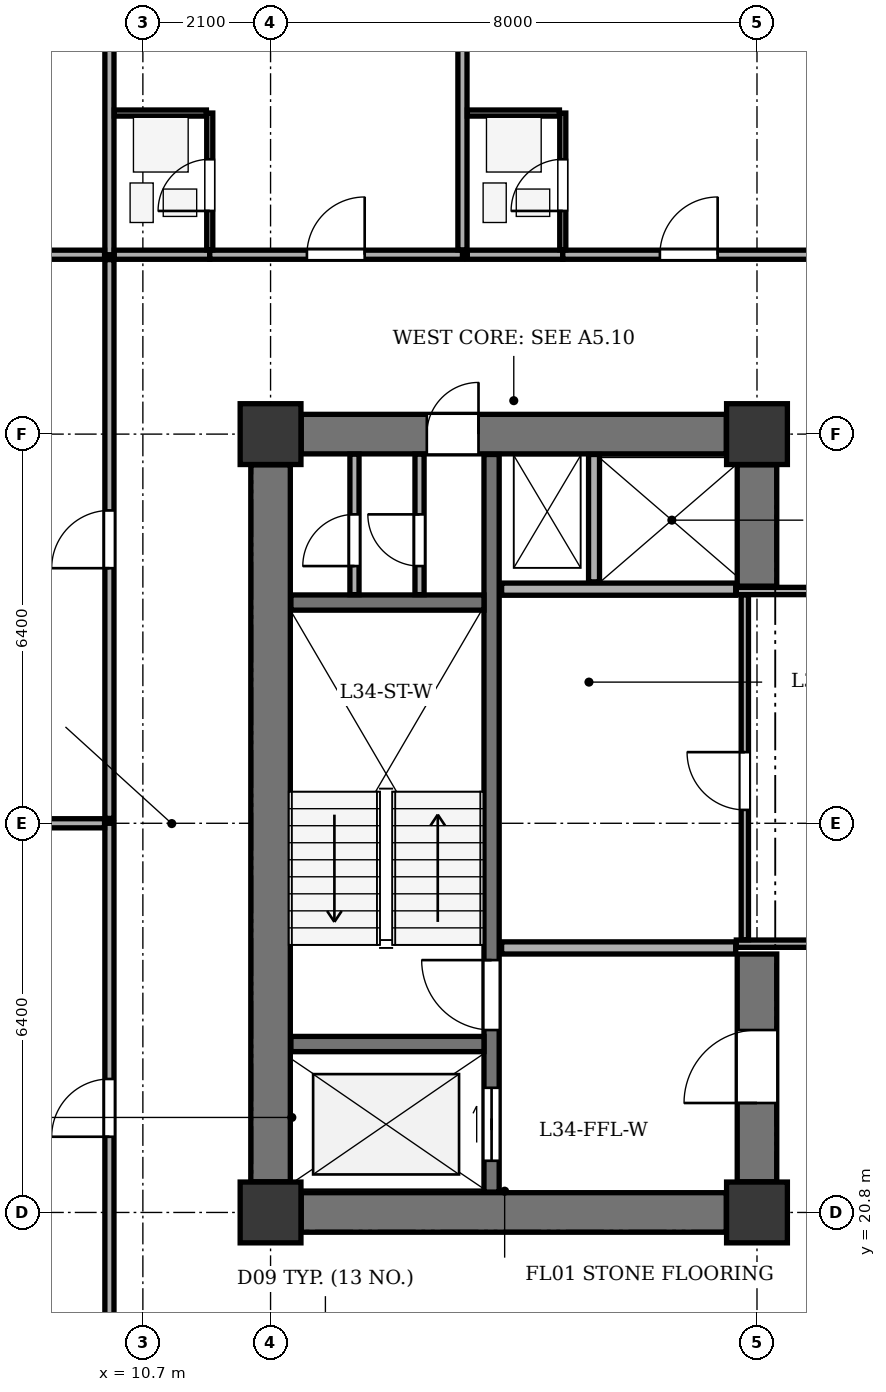
"""IFC4 building model, lengths in metres.
Left out: names, types, materials, properties, quantities, classifications, styles, units other than length and angle.
Written with IfcOpenShell. Run it as: python <this file> out.ifc"""

import sys

from ifc_helpers import new_model, si_unit, direction, frame, frame_2d, origin, origin_2d, place, context, subcontext, project, spatial, rectangle, extrude, element, fill, save


model = new_model("IFC4")
c1 = context("Model", 3, precision=1e-05, world=origin(), true_north=direction((0.0, 1.0)))
c2 = subcontext(c1, "Body", "Model", "MODEL_VIEW")
j1 = project(units=[si_unit("LENGTHUNIT", "METRE"), si_unit("PLANEANGLEUNIT", "RADIAN")], contexts=[c1])
p1 = place(None, origin())
s1 = spatial("IfcSite", under=j1, at=p1, CompositionType="ELEMENT")
p2 = place(p1, origin())
s2 = spatial("IfcBuilding", under=s1, at=p2, CompositionType="ELEMENT")
p3 = place(p2, frame((0.0, 0.0, 137.8)))
s3 = spatial("IfcBuildingStorey", under=s2, at=p3, CompositionType="ELEMENT", Elevation=137.8)
for number, where, z_axis, x_axis in (
    (1, (12.8, 20.8, 0.0), (0.0, 0.0, 1.0), (1.0, 0.0, 0.0)),
    (2, (20.8, 20.8, 0.0), (0.0, 0.0, 1.0), (1.0, 0.0, 0.0)),
    (3, (12.8, 33.6, 0.0), (0.0, 0.0, 1.0), (1.0, 0.0, 0.0)),
    (4, (20.8, 33.6, 0.0), (0.0, 0.0, 1.0), (1.0, 0.0, 0.0)),
):
    element("IfcColumn", number, at=place(p3, frame(where, z_axis=z_axis, x_axis=x_axis)), inside=s3, PredefinedType="COLUMN", context=c2, shape_type="SweptSolid", body=[
        extrude(rectangle(XDim=1.0, YDim=1.0, at=origin_2d()), origin(), (0.0, 0.0, 1.0), 3.5),
    ])
p4 = place(p3, frame((12.8, 21.305, 0.0), z_axis=(0.0, 0.0, 1.0), x_axis=(0.0, 1.0, 0.0)))
e5 = element("IfcWall", 5, at=p4, inside=s3, PredefinedType="SHEAR", context=c2, shape_type="SweptSolid", body=[
    extrude(rectangle(XDim=11.79, YDim=0.65, at=frame_2d((5.895, 0.0))), origin(), (0.0, 0.0, 1.0), 3.05),
])
p5 = place(p3, frame((13.305, 20.8, 0.0), z_axis=(0.0, 0.0, 1.0), x_axis=(1.0, 0.0, 0.0)))
e6 = element("IfcWall", 6, at=p5, inside=s3, PredefinedType="SHEAR", context=c2, shape_type="SweptSolid", body=[
    extrude(rectangle(XDim=6.99, YDim=0.65, at=frame_2d((3.495, 0.0))), origin(), (0.0, 0.0, 1.0), 3.05),
])
p6 = place(p3, frame((13.305, 33.6, 0.0), z_axis=(0.0, 0.0, 1.0), x_axis=(1.0, 0.0, 0.0)))
e7 = element("IfcWall", 7, at=p6, inside=s3, PredefinedType="SHEAR", context=c2, shape_type="SweptSolid", body=[
    extrude(rectangle(XDim=6.99, YDim=0.65, at=frame_2d((3.495, 0.0))), origin(), (0.0, 0.0, 1.0), 3.05),
])
p7 = place(p6, frame((2.065, 0.0, 0.0)))
e8 = element("IfcOpeningElement", 8, at=p7, cuts=e7, PredefinedType="OPENING", context=c2, shape_type="SweptSolid", body=[
    extrude(rectangle(XDim=0.85, YDim=2.02, at=frame_2d((0.425, 1.01))), frame((0.0, 0.335, 0.0), z_axis=(0.0, -1.0, 0.0), x_axis=(1.0, 0.0, 0.0)), (0.0, 0.0, 1.0), 0.67),
])
p8 = place(p3, frame((20.8, 21.305, 0.0), z_axis=(0.0, 0.0, 1.0), x_axis=(0.0, 1.0, 0.0)))
e9 = element("IfcWall", 9, at=p8, inside=s3, PredefinedType="SHEAR", context=c2, shape_type="SweptSolid", body=[
    extrude(rectangle(XDim=3.745, YDim=0.65, at=frame_2d((1.873, 0.0))), origin(), (0.0, 0.0, 1.0), 3.05),
])
p9 = place(p8, frame((1.295, 0.0, 0.0)))
e10 = element("IfcOpeningElement", 10, at=p9, cuts=e9, PredefinedType="OPENING", context=c2, shape_type="SweptSolid", body=[
    extrude(rectangle(XDim=1.2, YDim=2.15, at=frame_2d((0.6, 1.075))), frame((0.0, 0.335, 0.0), z_axis=(0.0, -1.0, 0.0), x_axis=(1.0, 0.0, 0.0)), (0.0, 0.0, 1.0), 0.67),
])
p10 = place(p3, frame((20.8, 31.1, 0.0), z_axis=(0.0, 0.0, 1.0), x_axis=(0.0, 1.0, 0.0)))
e11 = element("IfcWall", 11, at=p10, inside=s3, PredefinedType="SHEAR", context=c2, shape_type="SweptSolid", body=[
    extrude(rectangle(XDim=1.995, YDim=0.65, at=frame_2d((0.998, 0.0))), origin(), (0.0, 0.0, 1.0), 3.05),
])
p11 = place(p3, frame((16.435, 21.135, 0.0), z_axis=(0.0, 0.0, 1.0), x_axis=(0.0, 1.0, 0.0)))
e12 = element("IfcWall", 12, at=p11, inside=s3, PredefinedType="SHEAR", context=c2, shape_type="SweptSolid", body=[
    extrude(rectangle(XDim=12.13, YDim=0.25, at=frame_2d((6.065, 0.0))), origin(), (0.0, 0.0, 1.0), 3.05),
])
p12 = place(p11, frame((0.515, 0.0, 0.0)))
e13 = element("IfcOpeningElement", 13, at=p12, cuts=e12, PredefinedType="OPENING", context=c2, shape_type="SweptSolid", body=[
    extrude(rectangle(XDim=1.2, YDim=2.15, at=frame_2d((0.6, 1.075))), frame((0.0, 0.135, 0.0), z_axis=(0.0, -1.0, 0.0), x_axis=(1.0, 0.0, 0.0)), (0.0, 0.0, 1.0), 0.27),
])
p13 = place(p11, frame((2.665, 0.0, 0.0)))
e14 = element("IfcOpeningElement", 14, at=p13, cuts=e12, PredefinedType="OPENING", context=c2, shape_type="SweptSolid", body=[
    extrude(rectangle(XDim=1.15, YDim=2.15, at=frame_2d((0.575, 1.075))), frame((0.0, 0.135, 0.0), z_axis=(0.0, -1.0, 0.0), x_axis=(1.0, 0.0, 0.0)), (0.0, 0.0, 1.0), 0.27),
])
for number, where, z_axis, x_axis in (
    (15, (13.135, 23.57, 0.0), (0.0, 0.0, 1.0), (1.0, 0.0, 0.0)),
    (16, (13.135, 30.83, 0.0), (0.0, 0.0, 1.0), (1.0, 0.0, 0.0)),
):
    element("IfcWall", number, at=place(p3, frame(where, z_axis=z_axis, x_axis=x_axis)), inside=s3, PredefinedType="SHEAR", context=c2, shape_type="SweptSolid", body=[
        extrude(rectangle(XDim=3.175, YDim=0.25, at=frame_2d((1.587, 0.0))), origin(), (0.0, 0.0, 1.0), 3.05),
    ])
for number, where, z_axis, x_axis in (
    (17, (16.6, 25.15, 0.0), (0.0, 0.0, 1.0), (1.0, 0.0, 0.0)),
    (18, (16.6, 31.05, 0.0), (0.0, 0.0, 1.0), (1.0, 0.0, 0.0)),
):
    element("IfcWall", number, at=place(p3, frame(where, z_axis=z_axis, x_axis=x_axis)), inside=s3, PredefinedType="SOLIDWALL", context=c2, shape_type="SweptSolid", body=[
        extrude(rectangle(XDim=3.85, YDim=0.2, at=frame_2d((1.925, 0.0))), origin(), (0.0, 0.0, 1.0), 3.05),
    ])
p14 = place(p3, frame((18.12, 31.17, 0.0), z_axis=(0.0, 0.0, 1.0), x_axis=(0.0, 1.0, 0.0)))
e19 = element("IfcWall", 19, at=p14, inside=s3, PredefinedType="PARTITIONING", context=c2, shape_type="SweptSolid", body=[
    extrude(rectangle(XDim=2.095, YDim=0.18, at=frame_2d((1.047, 0.0))), origin(), (0.0, 0.0, 1.0), 3.05),
])
p15 = place(p3, frame((14.18, 30.96, 0.0), z_axis=(0.0, 0.0, 1.0), x_axis=(0.0, 1.0, 0.0)))
e20 = element("IfcWall", 20, at=p15, inside=s3, PredefinedType="PARTITIONING", context=c2, shape_type="SweptSolid", body=[
    extrude(rectangle(XDim=2.31, YDim=0.15, at=frame_2d((1.155, 0.0))), origin(), (0.0, 0.0, 1.0), 3.05),
])
p16 = place(p15, frame((0.47, 0.0, 0.0)))
e21 = element("IfcOpeningElement", 21, at=p16, cuts=e20, PredefinedType="OPENING", context=c2, shape_type="SweptSolid", body=[
    extrude(rectangle(XDim=0.85, YDim=2.02, at=frame_2d((0.425, 1.01))), frame((0.0, 0.085, 0.0), z_axis=(0.0, -1.0, 0.0), x_axis=(1.0, 0.0, 0.0)), (0.0, 0.0, 1.0), 0.17),
])
p17 = place(p3, frame((15.25, 30.96, 0.0), z_axis=(0.0, 0.0, 1.0), x_axis=(0.0, 1.0, 0.0)))
e22 = element("IfcWall", 22, at=p17, inside=s3, PredefinedType="PARTITIONING", context=c2, shape_type="SweptSolid", body=[
    extrude(rectangle(XDim=2.31, YDim=0.15, at=frame_2d((1.155, 0.0))), origin(), (0.0, 0.0, 1.0), 3.05),
])
p18 = place(p17, frame((0.47, 0.0, 0.0)))
e23 = element("IfcOpeningElement", 23, at=p18, cuts=e22, PredefinedType="OPENING", context=c2, shape_type="SweptSolid", body=[
    extrude(rectangle(XDim=0.85, YDim=2.02, at=frame_2d((0.425, 1.01))), frame((0.0, 0.085, 0.0), z_axis=(0.0, -1.0, 0.0), x_axis=(1.0, 0.0, 0.0)), (0.0, 0.0, 1.0), 0.17),
])
p19 = place(p3, frame((20.46, 25.22, 0.0), z_axis=(0.0, 0.0, 1.0), x_axis=(1.0, 0.0, 0.0)))
e24 = element("IfcWall", 24, at=p19, inside=s3, PredefinedType="PARTITIONING", context=c2, shape_type="SweptSolid", body=[
    extrude(rectangle(XDim=11.94, YDim=0.12, at=frame_2d((5.97, 0.0))), origin(), (0.0, 0.0, 1.0), 3.05),
])
p20 = place(p19, frame((2.39, 0.0, 0.0)))
e25 = element("IfcOpeningElement", 25, at=p20, cuts=e24, PredefinedType="OPENING", context=c2, shape_type="SweptSolid", body=[
    extrude(rectangle(XDim=1.0, YDim=2.1, at=frame_2d((0.5, 1.05))), frame((0.0, 0.07, 0.0), z_axis=(0.0, -1.0, 0.0), x_axis=(1.0, 0.0, 0.0)), (0.0, 0.0, 1.0), 0.14),
])
p21 = place(p3, frame((20.46, 31.02, 0.0), z_axis=(0.0, 0.0, 1.0), x_axis=(1.0, 0.0, 0.0)))
e26 = element("IfcWall", 26, at=p21, inside=s3, PredefinedType="PARTITIONING", context=c2, shape_type="SweptSolid", body=[
    extrude(rectangle(XDim=11.94, YDim=0.12, at=frame_2d((5.97, 0.0))), origin(), (0.0, 0.0, 1.0), 3.05),
])
p22 = place(p3, frame((20.6, 25.285, 0.0), z_axis=(0.0, 0.0, 1.0), x_axis=(0.0, 1.0, 0.0)))
e27 = element("IfcWall", 27, at=p22, inside=s3, PredefinedType="PARTITIONING", context=c2, shape_type="SweptSolid", body=[
    extrude(rectangle(XDim=5.67, YDim=0.12, at=frame_2d((2.835, 0.0))), origin(), (0.0, 0.0, 1.0), 2.585),
])
p23 = place(p22, frame((2.135, 0.0, 0.0)))
e28 = element("IfcOpeningElement", 28, at=p23, cuts=e27, PredefinedType="OPENING", context=c2, shape_type="SweptSolid", body=[
    extrude(rectangle(XDim=0.95, YDim=2.1, at=frame_2d((0.475, 1.05))), frame((0.0, 0.07, 0.0), z_axis=(0.0, -1.0, 0.0), x_axis=(1.0, 0.0, 0.0)), (0.0, 0.0, 1.0), 0.14),
])
p24 = place(p3, frame((10.15, 36.55, 0.0), z_axis=(0.0, 0.0, 1.0), x_axis=(0.0, 1.0, 0.0)))
e29 = element("IfcWall", 29, at=p24, inside=s3, PredefinedType="PARTITIONING", context=c2, shape_type="SweptSolid", body=[
    extrude(rectangle(XDim=9.575, YDim=0.15, at=frame_2d((4.788, 0.0))), origin(), (0.0, 0.0, 1.0), 3.05),
])
p25 = place(p3, frame((10.23, 36.55, 0.0), z_axis=(0.0, 0.0, 1.0), x_axis=(1.0, 0.0, 0.0)))
e30 = element("IfcWall", 30, at=p25, inside=s3, PredefinedType="PARTITIONING", context=c2, shape_type="SweptSolid", body=[
    extrude(rectangle(XDim=1.57, YDim=0.15, at=frame_2d((0.785, 0.0))), origin(), (0.0, 0.0, 1.0), 3.05),
])
p26 = place(p3, frame((11.8, 36.55, 0.0), z_axis=(0.0, 0.0, 1.0), x_axis=(1.0, 0.0, 0.0)))
e31 = element("IfcWall", 31, at=p26, inside=s3, PredefinedType="PARTITIONING", context=c2, shape_type="SweptSolid", body=[
    extrude(rectangle(XDim=4.156, YDim=0.15, at=frame_2d((2.078, 0.0))), origin(), (0.0, 0.0, 1.0), 3.05),
])
p27 = place(p26, frame((1.598, 0.0, 0.0)))
e32 = element("IfcOpeningElement", 32, at=p27, cuts=e31, PredefinedType="OPENING", context=c2, shape_type="SweptSolid", body=[
    extrude(rectangle(XDim=0.95, YDim=2.1, at=frame_2d((0.475, 1.05))), frame((0.0, 0.085, 0.0), z_axis=(0.0, -1.0, 0.0), x_axis=(1.0, 0.0, 0.0)), (0.0, 0.0, 1.0), 0.17),
])
p28 = place(p3, frame((11.8, 36.63, 0.0), z_axis=(0.0, 0.0, 1.0), x_axis=(0.0, 1.0, 0.0)))
e33 = element("IfcWall", 33, at=p28, inside=s3, PredefinedType="PARTITIONING", context=c2, shape_type="SweptSolid", body=[
    extrude(rectangle(XDim=2.25, YDim=0.1, at=frame_2d((1.125, 0.0))), origin(), (0.0, 0.0, 1.0), 3.05),
])
p29 = place(p28, frame((0.64, 0.0, 0.0)))
e34 = element("IfcOpeningElement", 34, at=p29, cuts=e33, PredefinedType="OPENING", context=c2, shape_type="SweptSolid", body=[
    extrude(rectangle(XDim=0.85, YDim=2.05, at=frame_2d((0.425, 1.025))), frame((0.0, 0.06, 0.0), z_axis=(0.0, -1.0, 0.0), x_axis=(1.0, 0.0, 0.0)), (0.0, 0.0, 1.0), 0.12),
])
p30 = place(p3, frame((10.23, 38.88, 0.0), z_axis=(0.0, 0.0, 1.0), x_axis=(1.0, 0.0, 0.0)))
e35 = element("IfcWall", 35, at=p30, inside=s3, PredefinedType="PARTITIONING", context=c2, shape_type="SweptSolid", body=[
    extrude(rectangle(XDim=1.515, YDim=0.1, at=frame_2d((0.758, 0.0))), origin(), (0.0, 0.0, 1.0), 3.05),
])
p31 = place(p3, frame((15.956, 36.63, 0.0), z_axis=(0.0, 0.0, 1.0), x_axis=(0.0, 1.0, 0.0)))
e36 = element("IfcWall", 36, at=p31, inside=s3, PredefinedType="PARTITIONING", context=c2, shape_type="SweptSolid", body=[
    extrude(rectangle(XDim=9.495, YDim=0.15, at=frame_2d((4.748, 0.0))), origin(), (0.0, 0.0, 1.0), 2.235),
])
p32 = place(p3, frame((16.036, 36.55, 0.0), z_axis=(0.0, 0.0, 1.0), x_axis=(1.0, 0.0, 0.0)))
e37 = element("IfcWall", 37, at=p32, inside=s3, PredefinedType="PARTITIONING", context=c2, shape_type="SweptSolid", body=[
    extrude(rectangle(XDim=1.57, YDim=0.15, at=frame_2d((0.785, 0.0))), origin(), (0.0, 0.0, 1.0), 3.05),
])
p33 = place(p3, frame((17.606, 36.55, 0.0), z_axis=(0.0, 0.0, 1.0), x_axis=(1.0, 0.0, 0.0)))
e38 = element("IfcWall", 38, at=p33, inside=s3, PredefinedType="PARTITIONING", context=c2, shape_type="SweptSolid", body=[
    extrude(rectangle(XDim=4.155, YDim=0.15, at=frame_2d((2.078, 0.0))), origin(), (0.0, 0.0, 1.0), 3.05),
])
p34 = place(p33, frame((1.597, 0.0, 0.0)))
e39 = element("IfcOpeningElement", 39, at=p34, cuts=e38, PredefinedType="OPENING", context=c2, shape_type="SweptSolid", body=[
    extrude(rectangle(XDim=0.95, YDim=2.1, at=frame_2d((0.475, 1.05))), frame((0.0, 0.085, 0.0), z_axis=(0.0, -1.0, 0.0), x_axis=(1.0, 0.0, 0.0)), (0.0, 0.0, 1.0), 0.17),
])
p35 = place(p3, frame((17.606, 36.63, 0.0), z_axis=(0.0, 0.0, 1.0), x_axis=(0.0, 1.0, 0.0)))
e40 = element("IfcWall", 40, at=p35, inside=s3, PredefinedType="PARTITIONING", context=c2, shape_type="SweptSolid", body=[
    extrude(rectangle(XDim=2.25, YDim=0.1, at=frame_2d((1.125, 0.0))), origin(), (0.0, 0.0, 1.0), 3.05),
])
p36 = place(p35, frame((0.64, 0.0, 0.0)))
e41 = element("IfcOpeningElement", 41, at=p36, cuts=e40, PredefinedType="OPENING", context=c2, shape_type="SweptSolid", body=[
    extrude(rectangle(XDim=0.85, YDim=2.05, at=frame_2d((0.425, 1.025))), frame((0.0, 0.06, 0.0), z_axis=(0.0, -1.0, 0.0), x_axis=(1.0, 0.0, 0.0)), (0.0, 0.0, 1.0), 0.12),
])
p37 = place(p3, frame((16.036, 38.88, 0.0), z_axis=(0.0, 0.0, 1.0), x_axis=(1.0, 0.0, 0.0)))
e42 = element("IfcWall", 42, at=p37, inside=s3, PredefinedType="PARTITIONING", context=c2, shape_type="SweptSolid", body=[
    extrude(rectangle(XDim=1.515, YDim=0.1, at=frame_2d((0.758, 0.0))), origin(), (0.0, 0.0, 1.0), 3.05),
])
p38 = place(p3, frame((4.675, 36.55, 0.0), z_axis=(0.0, 0.0, 1.0), x_axis=(1.0, 0.0, 0.0)))
e43 = element("IfcWall", 43, at=p38, inside=s3, PredefinedType="PARTITIONING", context=c2, shape_type="SweptSolid", body=[
    extrude(rectangle(XDim=5.395, YDim=0.15, at=frame_2d((2.698, 0.0))), origin(), (0.0, 0.0, 1.0), 3.05),
])
p39 = place(p3, frame((10.15, 17.93, 0.0), z_axis=(0.0, 0.0, 1.0), x_axis=(0.0, 1.0, 0.0)))
e44 = element("IfcWall", 44, at=p39, inside=s3, PredefinedType="PARTITIONING", context=c2, shape_type="SweptSolid", body=[
    extrude(rectangle(XDim=9.27, YDim=0.15, at=frame_2d((4.635, 0.0))), origin(), (0.0, 0.0, 1.0), 3.05),
])
p40 = place(p39, frame((4.115, 0.0, 0.0)))
e45 = element("IfcOpeningElement", 45, at=p40, cuts=e44, PredefinedType="OPENING", context=c2, shape_type="SweptSolid", body=[
    extrude(rectangle(XDim=0.95, YDim=2.1, at=frame_2d((0.475, 1.05))), frame((0.0, 0.085, 0.0), z_axis=(0.0, -1.0, 0.0), x_axis=(1.0, 0.0, 0.0)), (0.0, 0.0, 1.0), 0.17),
])
p41 = place(p3, frame((4.675, 27.2, 0.0), z_axis=(0.0, 0.0, 1.0), x_axis=(1.0, 0.0, 0.0)))
e46 = element("IfcWall", 46, at=p41, inside=s3, PredefinedType="PARTITIONING", context=c2, shape_type="SweptSolid", body=[
    extrude(rectangle(XDim=5.395, YDim=0.15, at=frame_2d((2.698, 0.0))), origin(), (0.0, 0.0, 1.0), 3.05),
])
p42 = place(p3, frame((10.15, 27.28, 0.0), z_axis=(0.0, 0.0, 1.0), x_axis=(0.0, 1.0, 0.0)))
e47 = element("IfcWall", 47, at=p42, inside=s3, PredefinedType="PARTITIONING", context=c2, shape_type="SweptSolid", body=[
    extrude(rectangle(XDim=9.19, YDim=0.15, at=frame_2d((4.595, 0.0))), origin(), (0.0, 0.0, 1.0), 3.05),
])
p43 = place(p42, frame((4.115, 0.0, 0.0)))
e48 = element("IfcOpeningElement", 48, at=p43, cuts=e47, PredefinedType="OPENING", context=c2, shape_type="SweptSolid", body=[
    extrude(rectangle(XDim=0.95, YDim=2.1, at=frame_2d((0.475, 1.05))), frame((0.0, 0.085, 0.0), z_axis=(0.0, -1.0, 0.0), x_axis=(1.0, 0.0, 0.0)), (0.0, 0.0, 1.0), 0.17),
])
p44 = place(p7, origin())
e49 = element("IfcDoor", 49, at=p44, inside=s3, OperationType="SINGLE_SWING_RIGHT", PredefinedType="DOOR", context=c2, shape_type="SweptSolid", body=[
    extrude(rectangle(XDim=0.85, YDim=2.02, at=frame_2d((0.425, 1.01))), frame((0.0, 0.025, 0.0), z_axis=(0.0, -1.0, 0.0), x_axis=(1.0, 0.0, 0.0)), (0.0, 0.0, 1.0), 0.05),
])
fill(e8, e49)
p45 = place(p9, origin())
e50 = element("IfcDoor", 50, at=p45, inside=s3, OperationType="SINGLE_SWING_LEFT", PredefinedType="DOOR", context=c2, shape_type="SweptSolid", body=[
    extrude(rectangle(XDim=1.2, YDim=2.15, at=frame_2d((0.6, 1.075))), frame((0.0, 0.025, 0.0), z_axis=(0.0, -1.0, 0.0), x_axis=(1.0, 0.0, 0.0)), (0.0, 0.0, 1.0), 0.05),
])
fill(e10, e50)
p46 = place(p12, origin())
e51 = element("IfcDoor", 51, at=p46, inside=s3, OperationType="DOUBLE_DOOR_SLIDING", PredefinedType="DOOR", context=c2, shape_type="SweptSolid", body=[
    extrude(rectangle(XDim=1.2, YDim=2.15, at=frame_2d((0.6, 1.075))), frame((0.0, 0.025, 0.0), z_axis=(0.0, -1.0, 0.0), x_axis=(1.0, 0.0, 0.0)), (0.0, 0.0, 1.0), 0.05),
])
fill(e13, e51)
p47 = place(p13, origin())
e52 = element("IfcDoor", 52, at=p47, inside=s3, OperationType="SINGLE_SWING_RIGHT", PredefinedType="DOOR", context=c2, shape_type="SweptSolid", body=[
    extrude(rectangle(XDim=1.15, YDim=2.15, at=frame_2d((0.575, 1.075))), frame((0.0, 0.025, 0.0), z_axis=(0.0, -1.0, 0.0), x_axis=(1.0, 0.0, 0.0)), (0.0, 0.0, 1.0), 0.05),
])
fill(e14, e52)
p48 = place(p16, origin())
e53 = element("IfcDoor", 53, at=p48, inside=s3, OperationType="SINGLE_SWING_LEFT", PredefinedType="DOOR", context=c2, shape_type="SweptSolid", body=[
    extrude(rectangle(XDim=0.85, YDim=2.02, at=frame_2d((0.425, 1.01))), frame((0.0, 0.025, 0.0), z_axis=(0.0, -1.0, 0.0), x_axis=(1.0, 0.0, 0.0)), (0.0, 0.0, 1.0), 0.05),
])
fill(e21, e53)
p49 = place(p18, origin())
e54 = element("IfcDoor", 54, at=p49, inside=s3, OperationType="SINGLE_SWING_RIGHT", PredefinedType="DOOR", context=c2, shape_type="SweptSolid", body=[
    extrude(rectangle(XDim=0.85, YDim=2.02, at=frame_2d((0.425, 1.01))), frame((0.0, 0.025, 0.0), z_axis=(0.0, -1.0, 0.0), x_axis=(1.0, 0.0, 0.0)), (0.0, 0.0, 1.0), 0.05),
])
fill(e23, e54)
p50 = place(p23, origin())
e55 = element("IfcDoor", 55, at=p50, inside=s3, OperationType="SINGLE_SWING_RIGHT", PredefinedType="DOOR", context=c2, shape_type="SweptSolid", body=[
    extrude(rectangle(XDim=0.95, YDim=2.1, at=frame_2d((0.475, 1.05))), frame((0.0, 0.025, 0.0), z_axis=(0.0, -1.0, 0.0), x_axis=(1.0, 0.0, 0.0)), (0.0, 0.0, 1.0), 0.05),
])
fill(e28, e55)
p51 = place(p29, origin())
e56 = element("IfcDoor", 56, at=p51, inside=s3, OperationType="SINGLE_SWING_LEFT", PredefinedType="DOOR", context=c2, shape_type="SweptSolid", body=[
    extrude(rectangle(XDim=0.85, YDim=2.05, at=frame_2d((0.425, 1.025))), frame((0.0, 0.025, 0.0), z_axis=(0.0, -1.0, 0.0), x_axis=(1.0, 0.0, 0.0)), (0.0, 0.0, 1.0), 0.05),
])
fill(e34, e56)
p52 = place(p27, origin())
e57 = element("IfcDoor", 57, at=p52, inside=s3, OperationType="SINGLE_SWING_RIGHT", PredefinedType="DOOR", context=c2, shape_type="SweptSolid", body=[
    extrude(rectangle(XDim=0.95, YDim=2.1, at=frame_2d((0.475, 1.05))), frame((0.0, 0.025, 0.0), z_axis=(0.0, -1.0, 0.0), x_axis=(1.0, 0.0, 0.0)), (0.0, 0.0, 1.0), 0.05),
])
fill(e32, e57)
p53 = place(p36, origin())
e58 = element("IfcDoor", 58, at=p53, inside=s3, OperationType="SINGLE_SWING_LEFT", PredefinedType="DOOR", context=c2, shape_type="SweptSolid", body=[
    extrude(rectangle(XDim=0.85, YDim=2.05, at=frame_2d((0.425, 1.025))), frame((0.0, 0.025, 0.0), z_axis=(0.0, -1.0, 0.0), x_axis=(1.0, 0.0, 0.0)), (0.0, 0.0, 1.0), 0.05),
])
fill(e41, e58)
p54 = place(p34, origin())
e59 = element("IfcDoor", 59, at=p54, inside=s3, OperationType="SINGLE_SWING_RIGHT", PredefinedType="DOOR", context=c2, shape_type="SweptSolid", body=[
    extrude(rectangle(XDim=0.95, YDim=2.1, at=frame_2d((0.475, 1.05))), frame((0.0, 0.025, 0.0), z_axis=(0.0, -1.0, 0.0), x_axis=(1.0, 0.0, 0.0)), (0.0, 0.0, 1.0), 0.05),
])
fill(e39, e59)
p55 = place(p40, origin())
e60 = element("IfcDoor", 60, at=p55, inside=s3, OperationType="SINGLE_SWING_LEFT", PredefinedType="DOOR", context=c2, shape_type="SweptSolid", body=[
    extrude(rectangle(XDim=0.95, YDim=2.1, at=frame_2d((0.475, 1.05))), frame((0.0, 0.025, 0.0), z_axis=(0.0, -1.0, 0.0), x_axis=(1.0, 0.0, 0.0)), (0.0, 0.0, 1.0), 0.05),
])
fill(e45, e60)
p56 = place(p43, origin())
e61 = element("IfcDoor", 61, at=p56, inside=s3, OperationType="SINGLE_SWING_LEFT", PredefinedType="DOOR", context=c2, shape_type="SweptSolid", body=[
    extrude(rectangle(XDim=0.95, YDim=2.1, at=frame_2d((0.475, 1.05))), frame((0.0, 0.025, 0.0), z_axis=(0.0, -1.0, 0.0), x_axis=(1.0, 0.0, 0.0)), (0.0, 0.0, 1.0), 0.05),
])
fill(e48, e61)
save(model, sys.argv[1])
